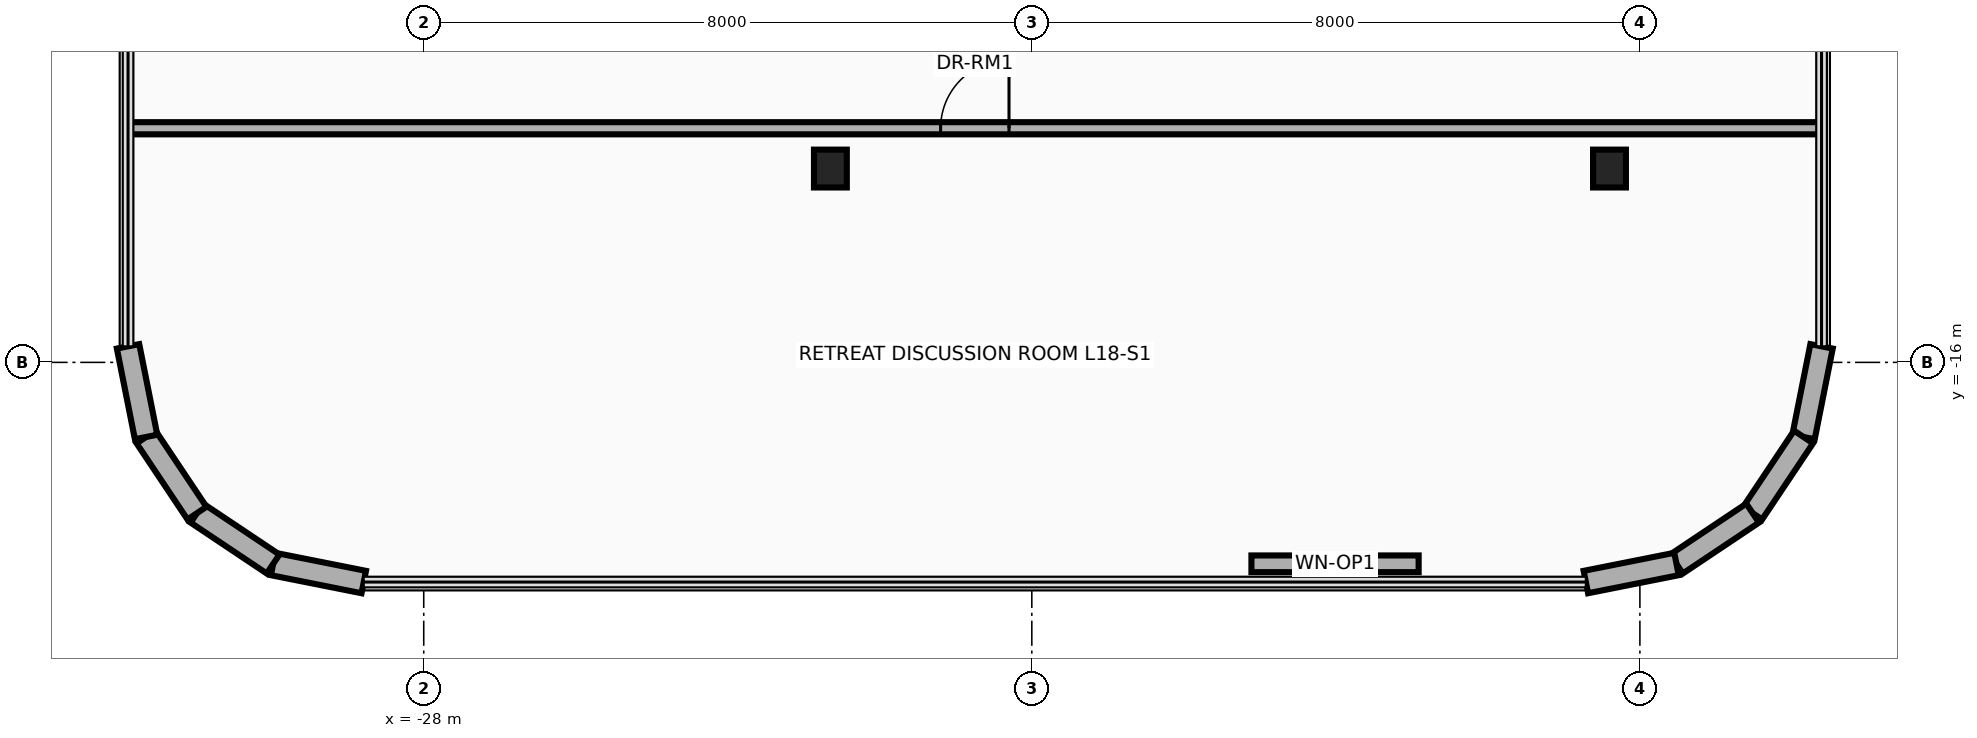
"""IFC4 building model, lengths in metres.
Left out: names, types, materials, properties, quantities, classifications, styles, units other than length and angle.
Written with IfcOpenShell. Run it as: python <this file> out.ifc"""

import sys

from ifc_helpers import new_model, si_unit, direction, frame, frame_2d, origin, origin_2d, place, context, subcontext, project, spatial, rectangle, i_section, extrude, source, transform, mapped, element, fill, save


model = new_model("IFC4")
c1 = context("Model", 3, precision=1e-05, world=origin(), true_north=direction((0.0, 1.0)))
c2 = subcontext(c1, "Body", "Model", "MODEL_VIEW")
j1 = project(units=[si_unit("LENGTHUNIT", "METRE"), si_unit("PLANEANGLEUNIT", "RADIAN")], contexts=[c1])
p1 = place(None, origin())
s1 = spatial("IfcSite", under=j1, at=p1, CompositionType="ELEMENT")
p2 = place(p1, origin())
s2 = spatial("IfcBuilding", under=s1, at=p2, CompositionType="ELEMENT")
p3 = place(p2, frame((0.0, 0.0, 74.1)))
s3 = spatial("IfcBuildingStorey", under=s2, at=p3, CompositionType="ELEMENT", Elevation=74.1)
m1 = source(origin(), c2, "Body", "SweptSolid", [
    extrude(i_section(OverallWidth=0.432, OverallDepth=0.498, WebThickness=0.056, FlangeThickness=0.089, at=origin_2d()), origin(), (0.0, 0.0, 1.0), 3.7),
])
for number, where, z_axis, x_axis in (
    (1, (-22.65, -13.45, 0.0), (0.0, 0.0, 1.0), (1.0, 0.0, 0.0)),
    (2, (-12.4, -13.45, 0.0), (0.0, 0.0, 1.0), (1.0, 0.0, 0.0)),
):
    element("IfcColumn", number, at=place(p3, frame(where, z_axis=z_axis, x_axis=x_axis)), inside=s3, PredefinedType="COLUMN", context=c2, shape_type="MappedRepresentation", body=[
        mapped(m1, transform((0.0, 0.0, 0.0), x_axis=(1.0, 0.0, 0.0), y_axis=(0.0, 1.0, 0.0), z_axis=(0.0, 0.0, 1.0), scale=1.0)),
    ])
p4 = place(p3, frame((-9.61, -15.789, 0.0), z_axis=(0.0, 0.0, 1.0), x_axis=(-0.194996050505, -0.980804027463, 0.0)))
e3 = element("IfcWall", 3, at=p4, inside=s3, PredefinedType="SOLIDWALL", context=c2, shape_type="SweptSolid", body=[
    extrude(rectangle(XDim=1.216, YDim=0.3, at=frame_2d((0.608, 0.0))), origin(), (0.0, 0.0, 1.0), 3.46),
])
for number, where, z_axis, x_axis in (
    (4, (-9.847, -16.982, 0.0), (0.0, 0.0, 1.0), (-0.556, -0.831, 0.0)),
    (5, (-10.517, -17.983, 0.0), (0.0, 0.0, 1.0), (-0.831, -0.556, 0.0)),
):
    element("IfcWall", number, at=place(p3, frame(where, z_axis=z_axis, x_axis=x_axis)), inside=s3, PredefinedType="SOLIDWALL", context=c2, shape_type="SweptSolid", body=[
        extrude(rectangle(XDim=1.205, YDim=0.3, at=frame_2d((0.603, 0.0))), origin(), (0.0, 0.0, 1.0), 3.46),
    ])
p5 = place(p3, frame((-11.518, -18.653, 0.0), z_axis=(0.0, 0.0, 1.0), x_axis=(-0.980804027463, -0.194996050505, 0.0)))
e6 = element("IfcWall", 6, at=p5, inside=s3, PredefinedType="SOLIDWALL", context=c2, shape_type="SweptSolid", body=[
    extrude(rectangle(XDim=1.216, YDim=0.3, at=frame_2d((0.608, 0.0))), origin(), (0.0, 0.0, 1.0), 3.46),
])
p6 = place(p3, frame((-14.911, -18.65, 0.0), z_axis=(0.0, 0.0, 1.0), x_axis=(-1.0, 0.0, 0.0)))
e7 = element("IfcWall", 7, at=p6, inside=s3, PredefinedType="SOLIDWALL", context=c2, shape_type="SweptSolid", body=[
    extrude(rectangle(XDim=2.2, YDim=0.22, at=frame_2d((1.1, 0.0))), origin(), (0.0, 0.0, 1.0), 3.46),
])
p7 = place(p6, frame((0.65, 0.0, 0.95)))
e8 = element("IfcOpeningElement", 8, at=p7, cuts=e7, PredefinedType="OPENING", context=c2, shape_type="SweptSolid", body=[
    extrude(rectangle(XDim=0.9, YDim=1.3, at=frame_2d((0.45, 0.65))), frame((0.0, 0.125, 0.0), z_axis=(0.0, -1.0, 0.0), x_axis=(1.0, 0.0, 0.0)), (0.0, 0.0, 1.0), 0.25),
])
p8 = place(p3, frame((-28.789, -18.89, 0.0), z_axis=(0.0, 0.0, 1.0), x_axis=(-0.980804027463, 0.194996050505, 0.0)))
e9 = element("IfcWall", 9, at=p8, inside=s3, PredefinedType="SOLIDWALL", context=c2, shape_type="SweptSolid", body=[
    extrude(rectangle(XDim=1.216, YDim=0.3, at=frame_2d((0.608, 0.0))), origin(), (0.0, 0.0, 1.0), 3.46),
])
for number, where, z_axis, x_axis in (
    (10, (-29.982, -18.653, 0.0), (0.0, 0.0, 1.0), (-0.831, 0.556, 0.0)),
    (11, (-30.983, -17.983, 0.0), (0.0, 0.0, 1.0), (-0.556, 0.831, 0.0)),
):
    element("IfcWall", number, at=place(p3, frame(where, z_axis=z_axis, x_axis=x_axis)), inside=s3, PredefinedType="SOLIDWALL", context=c2, shape_type="SweptSolid", body=[
        extrude(rectangle(XDim=1.205, YDim=0.3, at=frame_2d((0.603, 0.0))), origin(), (0.0, 0.0, 1.0), 3.46),
    ])
p9 = place(p3, frame((-31.653, -16.982, 0.0), z_axis=(0.0, 0.0, 1.0), x_axis=(-0.194996050505, 0.980804027463, 0.0)))
e12 = element("IfcWall", 12, at=p9, inside=s3, PredefinedType="SOLIDWALL", context=c2, shape_type="SweptSolid", body=[
    extrude(rectangle(XDim=1.216, YDim=0.3, at=frame_2d((0.608, 0.0))), origin(), (0.0, 0.0, 1.0), 3.46),
])
p10 = place(p3, frame((-31.89, -12.92, 0.0), z_axis=(0.0, 0.0, 1.0), x_axis=(1.0, 0.0, 0.0)))
e13 = element("IfcWall", 13, at=p10, inside=s3, PredefinedType="PARTITIONING", context=c2, shape_type="SweptSolid", body=[
    extrude(rectangle(XDim=22.28, YDim=0.16, at=frame_2d((11.14, 0.0))), origin(), (0.0, 0.0, 1.0), 2.834),
])
p11 = place(p10, frame((10.69, 0.0, 0.0)))
e14 = element("IfcOpeningElement", 14, at=p11, cuts=e13, PredefinedType="OPENING", context=c2, shape_type="SweptSolid", body=[
    extrude(rectangle(XDim=0.9, YDim=2.1, at=frame_2d((0.45, 1.05))), frame((0.0, 0.095, 0.0), z_axis=(0.0, -1.0, 0.0), x_axis=(1.0, 0.0, 0.0)), (0.0, 0.0, 1.0), 0.19),
])
p12 = place(p7, origin())
e15 = element("IfcWindow", 15, at=p12, inside=s3, PartitioningType="SINGLE_PANEL", PredefinedType="WINDOW", context=c2, shape_type="SweptSolid", body=[
    extrude(rectangle(XDim=0.9, YDim=1.3, at=frame_2d((0.45, 0.65))), frame((0.0, 0.03, 0.0), z_axis=(0.0, -1.0, 0.0), x_axis=(1.0, 0.0, 0.0)), (0.0, 0.0, 1.0), 0.06),
])
fill(e8, e15)
p13 = place(p11, origin())
e16 = element("IfcDoor", 16, at=p13, inside=s3, OperationType="SINGLE_SWING_RIGHT", PredefinedType="DOOR", context=c2, shape_type="SweptSolid", body=[
    extrude(rectangle(XDim=0.9, YDim=2.1, at=frame_2d((0.45, 1.05))), frame((0.0, 0.025, 0.0), z_axis=(0.0, -1.0, 0.0), x_axis=(1.0, 0.0, 0.0)), (0.0, 0.0, 1.0), 0.05),
])
fill(e14, e16)
save(model, sys.argv[1])
